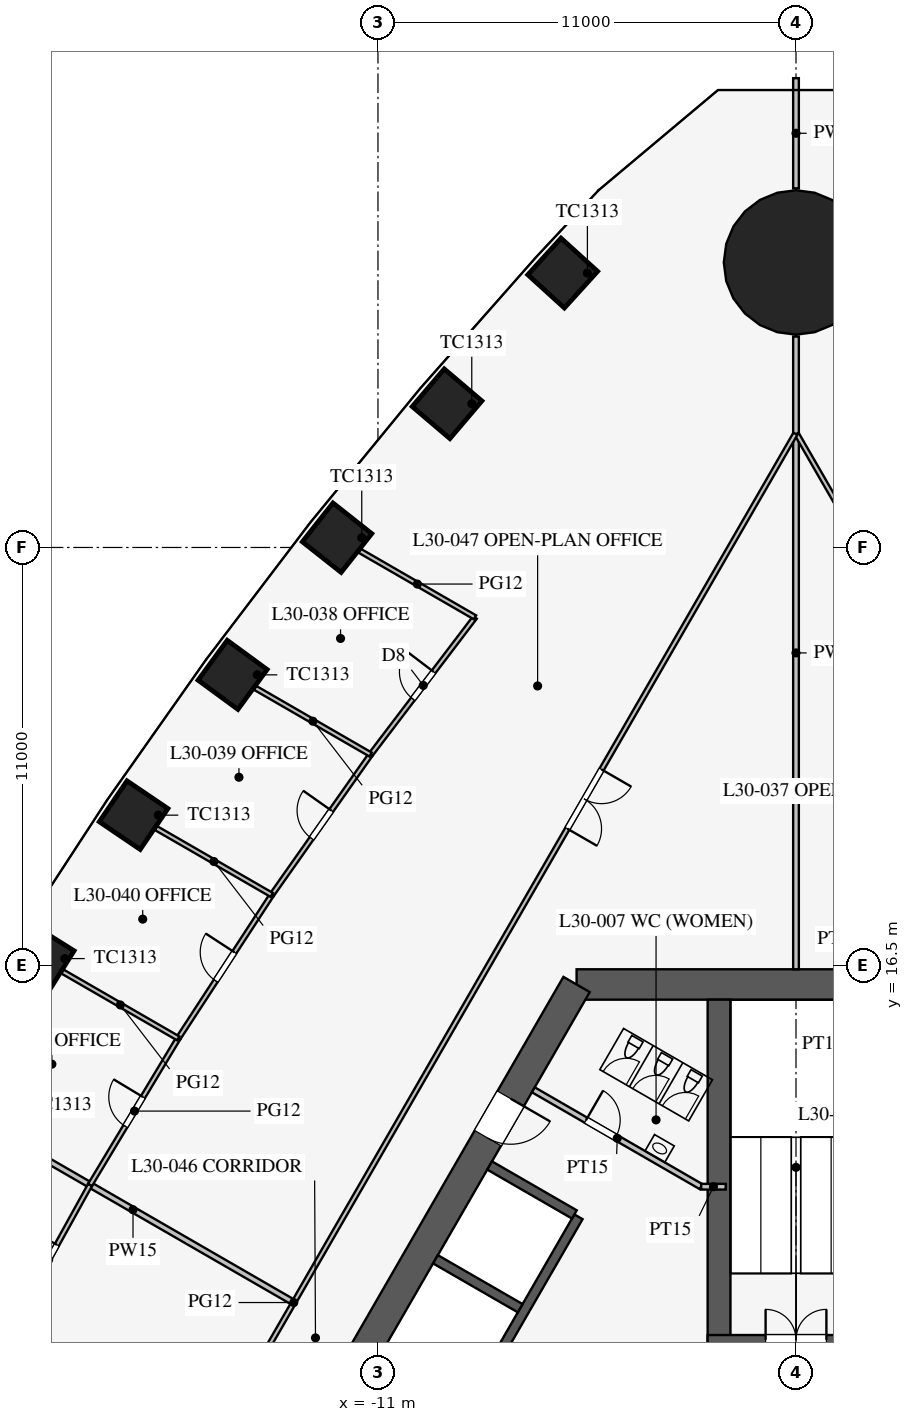
"""IFC4 building model, lengths in metres.
Left out: names, types, materials, properties, quantities, classifications, styles, units other than length and angle.
Written with IfcOpenShell. Run it as: python <this file> out.ifc"""

import sys

from ifc_helpers import new_model, si_unit, direction, frame, frame_2d, origin, origin_2d, place, context, subcontext, project, spatial, rectangle, circle, extrude, element, fill, save


model = new_model("IFC4")
c1 = context("Model", 3, precision=1e-05, world=origin(), true_north=direction((0.0, 1.0)))
c2 = subcontext(c1, "Body", "Model", "MODEL_VIEW")
j1 = project(units=[si_unit("LENGTHUNIT", "METRE"), si_unit("PLANEANGLEUNIT", "RADIAN")], contexts=[c1])
p1 = place(None, origin())
s1 = spatial("IfcSite", under=j1, at=p1, CompositionType="ELEMENT")
p2 = place(p1, origin())
s2 = spatial("IfcBuilding", under=s1, at=p2, CompositionType="ELEMENT")
p3 = place(p2, frame((0.0, 0.0, 132.5)))
s3 = spatial("IfcBuildingStorey", under=s2, at=p3, CompositionType="ELEMENT", Elevation=132.5)
for number, where, z_axis, x_axis in (
    (1, (-6.139, 34.721, 0.0), (0.0, 0.0, 1.0), (-0.672, -0.74, 0.0)),
    (2, (-9.182, 31.282, 0.0), (0.0, 0.0, 1.0), (-0.648, -0.762, 0.0)),
    (3, (-12.077, 27.757, 0.0), (0.0, 0.0, 1.0), (-0.62, -0.785, 0.0)),
    (4, (-14.825, 24.148, 0.0), (0.0, 0.0, 1.0), (-0.591, -0.807, 0.0)),
    (5, (-17.43, 20.456, 0.0), (0.0, 0.0, 1.0), (-0.561, -0.828, 0.0)),
    (6, (-19.893, 16.681, 0.0), (0.0, 0.0, 1.0), (-0.531, -0.847, 0.0)),
):
    element("IfcColumn", number, at=place(p3, frame(where, z_axis=z_axis, x_axis=x_axis)), inside=s3, PredefinedType="COLUMN", context=c2, shape_type="SweptSolid", body=[
        extrude(rectangle(XDim=1.3, YDim=1.3, at=origin_2d()), origin(), (0.0, 0.0, 1.0), 4.2),
    ])
p4 = place(p3, frame((0.0, 35.0, 0.0), z_axis=(0.0, 0.0, 1.0), x_axis=(1.0, 0.0, 0.0)))
e7 = element("IfcColumn", 7, at=p4, inside=s3, PredefinedType="COLUMN", context=c2, shape_type="SweptSolid", body=[
    extrude(circle(Radius=1.9, at=origin_2d()), origin(), (0.0, 0.0, 1.0), 4.2),
])
p5 = place(p3, frame((5.773, 16.0, 0.0), z_axis=(0.0, 0.0, 1.0), x_axis=(-1.0, 0.0, 0.0)))
e8 = element("IfcWall", 8, at=p5, inside=s3, PredefinedType="SHEAR", context=c2, shape_type="SweptSolid", body=[
    extrude(rectangle(XDim=11.547, YDim=0.8, at=frame_2d((5.773, 0.0))), origin(), (0.0, 0.0, 1.0), 4.2),
])
p6 = place(p3, frame((-5.773, 16.0, 0.0), z_axis=(0.0, 0.0, 1.0), x_axis=(-0.500002442456, -0.866023993627, 0.0)))
e9 = element("IfcWall", 9, at=p6, inside=s3, PredefinedType="SHEAR", context=c2, shape_type="SweptSolid", body=[
    extrude(rectangle(XDim=21.939, YDim=0.8, at=frame_2d((10.97, 0.0))), origin(), (0.0, 0.0, 1.0), 4.2),
])
p7 = place(p6, frame((17.27, 0.0, 0.0)))
e10 = element("IfcOpeningElement", 10, at=p7, cuts=e9, PredefinedType="OPENING", context=c2, shape_type="SweptSolid", body=[
    extrude(rectangle(XDim=1.2, YDim=2.1, at=frame_2d((0.6, 1.05))), frame((0.0, 0.41, 0.0), z_axis=(0.0, -1.0, 0.0), x_axis=(1.0, 0.0, 0.0)), (0.0, 0.0, 1.0), 0.82),
])
p8 = place(p6, frame((3.47, 0.0, 0.0)))
e11 = element("IfcOpeningElement", 11, at=p8, cuts=e9, PredefinedType="OPENING", context=c2, shape_type="SweptSolid", body=[
    extrude(rectangle(XDim=1.2, YDim=2.1, at=frame_2d((0.6, 1.05))), frame((0.0, 0.41, 0.0), z_axis=(0.0, -1.0, 0.0), x_axis=(1.0, 0.0, 0.0)), (0.0, 0.0, 1.0), 0.82),
])
p9 = place(p3, frame((-5.724, 9.886, 0.0), z_axis=(0.0, 0.0, 1.0), x_axis=(-0.500001763848, -0.866024385424, 0.0)))
e12 = element("IfcWall", 12, at=p9, inside=s3, PredefinedType="SHEAR", context=c2, shape_type="SweptSolid", body=[
    extrude(rectangle(XDim=11.4, YDim=0.25, at=frame_2d((5.7, 0.0))), origin(), (0.0, 0.0, 1.0), 4.2),
])
p10 = place(p9, frame((6.525, 0.0, 0.0)))
e13 = element("IfcOpeningElement", 13, at=p10, cuts=e12, PredefinedType="OPENING", context=c2, shape_type="SweptSolid", body=[
    extrude(rectangle(XDim=1.2, YDim=2.2, at=frame_2d((0.6, 1.1))), frame((0.0, 0.135, 0.0), z_axis=(0.0, -1.0, 0.0), x_axis=(1.0, 0.0, 0.0)), (0.0, 0.0, 1.0), 0.27),
])
p11 = place(p9, frame((9.375, 0.0, 0.0)))
e14 = element("IfcOpeningElement", 14, at=p11, cuts=e12, PredefinedType="OPENING", context=c2, shape_type="SweptSolid", body=[
    extrude(rectangle(XDim=1.2, YDim=2.2, at=frame_2d((0.6, 1.1))), frame((0.0, 0.135, 0.0), z_axis=(0.0, -1.0, 0.0), x_axis=(1.0, 0.0, 0.0)), (0.0, 0.0, 1.0), 0.27),
])
p12 = place(p3, frame((-5.832, 9.949, 0.0), z_axis=(0.0, 0.0, 1.0), x_axis=(-0.866029291668, 0.499993265928, 0.0)))
e15 = element("IfcWall", 15, at=p12, inside=s3, PredefinedType="SHEAR", context=c2, shape_type="SweptSolid", body=[
    extrude(rectangle(XDim=2.575, YDim=0.25, at=frame_2d((1.288, 0.0))), origin(), (0.0, 0.0, 1.0), 4.2),
])
p13 = place(p3, frame((-7.257, 7.481, 0.0), z_axis=(0.0, 0.0, 1.0), x_axis=(-0.866046643894, 0.499963209246, 0.0)))
e16 = element("IfcWall", 16, at=p13, inside=s3, PredefinedType="SHEAR", context=c2, shape_type="SweptSolid", body=[
    extrude(rectangle(XDim=2.575, YDim=0.25, at=frame_2d((1.288, 0.0))), origin(), (0.0, 0.0, 1.0), 4.2),
])
p14 = place(p3, frame((-2.025, 6.525, 0.0), z_axis=(0.0, 0.0, 1.0), x_axis=(0.0, 1.0, 0.0)))
e17 = element("IfcWall", 17, at=p14, inside=s3, PredefinedType="SHEAR", context=c2, shape_type="SweptSolid", body=[
    extrude(rectangle(XDim=9.075, YDim=0.6, at=frame_2d((4.538, 0.0))), origin(), (0.0, 0.0, 1.0), 4.2),
])
p15 = place(p3, frame((2.325, 6.65, 0.0), z_axis=(0.0, 0.0, 1.0), x_axis=(-1.0, 0.0, 0.0)))
e18 = element("IfcWall", 18, at=p15, inside=s3, PredefinedType="SHEAR", context=c2, shape_type="SweptSolid", body=[
    extrude(rectangle(XDim=4.65, YDim=0.25, at=frame_2d((2.325, 0.0))), origin(), (0.0, 0.0, 1.0), 4.2),
])
p16 = place(p15, frame((1.525, 0.0, 0.0)))
e19 = element("IfcOpeningElement", 19, at=p16, cuts=e18, PredefinedType="OPENING", context=c2, shape_type="SweptSolid", body=[
    extrude(rectangle(XDim=1.6, YDim=2.1, at=frame_2d((0.8, 1.05))), frame((0.0, 0.135, 0.0), z_axis=(0.0, -1.0, 0.0), x_axis=(1.0, 0.0, 0.0)), (0.0, 0.0, 1.0), 0.27),
])
p17 = place(p3, frame((-2.495, 10.678, 0.0), z_axis=(0.0, 0.0, 1.0), x_axis=(-0.86602216432, 0.500005610874, 0.0)))
e20 = element("IfcWall", 20, at=p17, inside=s3, PredefinedType="PARTITIONING", context=c2, shape_type="SweptSolid", body=[
    extrude(rectangle(XDim=5.1, YDim=0.15, at=frame_2d((2.55, 0.0))), origin(), (0.0, 0.0, 1.0), 4.0),
])
p18 = place(p17, frame((2.6, 0.0, 0.0)))
e21 = element("IfcOpeningElement", 21, at=p18, cuts=e20, PredefinedType="OPENING", context=c2, shape_type="SweptSolid", body=[
    extrude(rectangle(XDim=0.9, YDim=2.1, at=frame_2d((0.45, 1.05))), frame((0.0, 0.085, 0.0), z_axis=(0.0, -1.0, 0.0), x_axis=(1.0, 0.0, 0.0)), (0.0, 0.0, 1.0), 0.17),
])
p19 = place(p3, frame((-2.495, 10.678, 0.0), z_axis=(0.0, 0.0, 1.0), x_axis=(1.0, 0.0, 0.0)))
e22 = element("IfcWall", 22, at=p19, inside=s3, PredefinedType="PARTITIONING", context=c2, shape_type="SweptSolid", body=[
    extrude(rectangle(XDim=0.645, YDim=0.15, at=frame_2d((0.323, 0.0))), origin(), (0.0, 0.0, 1.0), 4.0),
])
p20 = place(p3, frame((0.0, 16.4, 0.0), z_axis=(0.0, 0.0, 1.0), x_axis=(0.0, 1.0, 0.0)))
e23 = element("IfcWall", 23, at=p20, inside=s3, PredefinedType="PARTITIONING", context=c2, shape_type="SweptSolid", body=[
    extrude(rectangle(XDim=16.65, YDim=0.15, at=frame_2d((8.325, 0.0))), origin(), (0.0, 0.0, 1.0), 2.3),
])
p21 = place(p3, frame((0.0, 36.95, 0.0), z_axis=(0.0, 0.0, 1.0), x_axis=(0.0, 1.0, 0.0)))
e24 = element("IfcWall", 24, at=p21, inside=s3, PredefinedType="PARTITIONING", context=c2, shape_type="SweptSolid", body=[
    extrude(rectangle(XDim=2.899, YDim=0.15, at=frame_2d((1.45, 0.0))), origin(), (0.0, 0.0, 1.0), 2.3),
])
p22 = place(p3, frame((26.415, -15.231, 0.0), z_axis=(0.0, 0.0, 1.0), x_axis=(-0.50000091641, 0.866024874695, 0.0)))
e25 = element("IfcWall", 25, at=p22, inside=s3, PredefinedType="PARTITIONING", context=c2, shape_type="SweptSolid", body=[
    extrude(rectangle(XDim=52.796, YDim=0.12, at=frame_2d((26.398, 0.0))), origin(), (0.0, 0.0, 1.0), 2.9),
])
p23 = place(p22, frame((10.2, 0.0, 0.15)))
e26 = element("IfcOpeningElement", 26, at=p23, cuts=e25, PredefinedType="OPENING", context=c2, shape_type="SweptSolid", body=[
    extrude(rectangle(XDim=1.8, YDim=2.1, at=frame_2d((0.9, 1.05))), frame((0.0, 0.07, 0.0), z_axis=(0.0, -1.0, 0.0), x_axis=(1.0, 0.0, 0.0)), (0.0, 0.0, 1.0), 0.14),
])
p24 = place(p22, frame((40.8, 0.0, 0.15)))
e27 = element("IfcOpeningElement", 27, at=p24, cuts=e25, PredefinedType="OPENING", context=c2, shape_type="SweptSolid", body=[
    extrude(rectangle(XDim=1.8, YDim=2.1, at=frame_2d((0.9, 1.05))), frame((0.0, 0.07, 0.0), z_axis=(0.0, -1.0, 0.0), x_axis=(1.0, 0.0, 0.0)), (0.0, 0.0, 1.0), 0.14),
])
p25 = place(p3, frame((-13.268, 7.66, 0.0), z_axis=(0.0, 0.0, 1.0), x_axis=(-0.866015788683, 0.500016653474, 0.0)))
e28 = element("IfcWall", 28, at=p25, inside=s3, PredefinedType="PARTITIONING", context=c2, shape_type="SweptSolid", body=[
    extrude(rectangle(XDim=9.65, YDim=0.15, at=frame_2d((4.825, 0.0))), origin(), (0.0, 0.0, 1.0), 3.2),
])
p26 = place(p3, frame((-0.016, 30.491, 0.0), z_axis=(0.0, 0.0, 1.0), x_axis=(-0.50000091641, -0.866024874695, 0.0)))
e29 = element("IfcWall", 29, at=p26, inside=s3, PredefinedType="PARTITIONING", context=c2, shape_type="SweptSolid", body=[
    extrude(rectangle(XDim=52.796, YDim=0.12, at=frame_2d((26.398, 0.0))), origin(), (0.0, 0.0, 1.0), 2.9),
])
p27 = place(p26, frame((10.2, 0.0, 0.15)))
e30 = element("IfcOpeningElement", 30, at=p27, cuts=e29, PredefinedType="OPENING", context=c2, shape_type="SweptSolid", body=[
    extrude(rectangle(XDim=1.8, YDim=2.1, at=frame_2d((0.9, 1.05))), frame((0.0, 0.07, 0.0), z_axis=(0.0, -1.0, 0.0), x_axis=(1.0, 0.0, 0.0)), (0.0, 0.0, 1.0), 0.14),
])
p28 = place(p26, frame((40.8, 0.0, 0.15)))
e31 = element("IfcOpeningElement", 31, at=p28, cuts=e29, PredefinedType="OPENING", context=c2, shape_type="SweptSolid", body=[
    extrude(rectangle(XDim=1.8, YDim=2.1, at=frame_2d((0.9, 1.05))), frame((0.0, 0.07, 0.0), z_axis=(0.0, -1.0, 0.0), x_axis=(1.0, 0.0, 0.0)), (0.0, 0.0, 1.0), 0.14),
])
p29 = place(p3, frame((-18.576, 10.725, 0.0), z_axis=(0.0, 0.0, 1.0), x_axis=(-0.484292898211, -0.874905931368, 0.0)))
e32 = element("IfcWall", 32, at=p29, inside=s3, PredefinedType="PARTITIONING", context=c2, shape_type="SweptSolid", body=[
    extrude(rectangle(XDim=4.501, YDim=0.12, at=frame_2d((2.25, 0.0))), origin(), (0.0, 0.0, 1.0), 2.9),
])
p30 = place(p29, frame((1.8, 0.0, 0.15)))
e33 = element("IfcOpeningElement", 33, at=p30, cuts=e32, PredefinedType="OPENING", context=c2, shape_type="SweptSolid", body=[
    extrude(rectangle(XDim=0.9, YDim=2.1, at=frame_2d((0.45, 1.05))), frame((0.0, 0.07, 0.0), z_axis=(0.0, -1.0, 0.0), x_axis=(1.0, 0.0, 0.0)), (0.0, 0.0, 1.0), 0.14),
])
p31 = place(p3, frame((-11.192, 22.05, 0.0), z_axis=(0.0, 0.0, 1.0), x_axis=(-0.575987178736, -0.817458726745, 0.0)))
e34 = element("IfcWall", 34, at=p31, inside=s3, PredefinedType="PARTITIONING", context=c2, shape_type="SweptSolid", body=[
    extrude(rectangle(XDim=4.518, YDim=0.12, at=frame_2d((2.259, 0.0))), origin(), (0.0, 0.0, 1.0), 2.9),
])
p32 = place(p31, frame((1.8, 0.0, 0.15)))
e35 = element("IfcOpeningElement", 35, at=p32, cuts=e34, PredefinedType="OPENING", context=c2, shape_type="SweptSolid", body=[
    extrude(rectangle(XDim=0.9, YDim=2.1, at=frame_2d((0.45, 1.05))), frame((0.0, 0.07, 0.0), z_axis=(0.0, -1.0, 0.0), x_axis=(1.0, 0.0, 0.0)), (0.0, 0.0, 1.0), 0.14),
])
p33 = place(p3, frame((-8.447, 25.661, 0.0), z_axis=(0.0, 0.0, 1.0), x_axis=(-0.605274299339, -0.796016973789, 0.0)))
e36 = element("IfcWall", 36, at=p33, inside=s3, PredefinedType="PARTITIONING", context=c2, shape_type="SweptSolid", body=[
    extrude(rectangle(XDim=4.536, YDim=0.12, at=frame_2d((2.268, 0.0))), origin(), (0.0, 0.0, 1.0), 2.9),
])
p34 = place(p33, frame((1.8, 0.0, 0.15)))
e37 = element("IfcOpeningElement", 37, at=p34, cuts=e36, PredefinedType="OPENING", context=c2, shape_type="SweptSolid", body=[
    extrude(rectangle(XDim=0.9, YDim=2.1, at=frame_2d((0.45, 1.05))), frame((0.0, 0.07, 0.0), z_axis=(0.0, -1.0, 0.0), x_axis=(1.0, 0.0, 0.0)), (0.0, 0.0, 1.0), 0.14),
])
p35 = place(p3, frame((-16.256, 14.581, 0.0), z_axis=(0.0, 0.0, 1.0), x_axis=(-0.515548366618, -0.856860479703, 0.0)))
e38 = element("IfcWall", 38, at=p35, inside=s3, PredefinedType="PARTITIONING", context=c2, shape_type="SweptSolid", body=[
    extrude(rectangle(XDim=4.501, YDim=0.12, at=frame_2d((2.25, 0.0))), origin(), (0.0, 0.0, 1.0), 2.9),
])
p36 = place(p35, frame((1.8, 0.0, 0.15)))
e39 = element("IfcOpeningElement", 39, at=p36, cuts=e38, PredefinedType="OPENING", context=c2, shape_type="SweptSolid", body=[
    extrude(rectangle(XDim=0.9, YDim=2.1, at=frame_2d((0.45, 1.05))), frame((0.0, 0.07, 0.0), z_axis=(0.0, -1.0, 0.0), x_axis=(1.0, 0.0, 0.0)), (0.0, 0.0, 1.0), 0.14),
])
p37 = place(p3, frame((-13.795, 18.357, 0.0), z_axis=(0.0, 0.0, 1.0), x_axis=(-0.546069464151, -0.837739900161, 0.0)))
e40 = element("IfcWall", 40, at=p37, inside=s3, PredefinedType="PARTITIONING", context=c2, shape_type="SweptSolid", body=[
    extrude(rectangle(XDim=4.507, YDim=0.12, at=frame_2d((2.253, 0.0))), origin(), (0.0, 0.0, 1.0), 2.9),
])
p38 = place(p37, frame((1.8, 0.0, 0.15)))
e41 = element("IfcOpeningElement", 41, at=p38, cuts=e40, PredefinedType="OPENING", context=c2, shape_type="SweptSolid", body=[
    extrude(rectangle(XDim=0.9, YDim=2.1, at=frame_2d((0.45, 1.05))), frame((0.0, 0.07, 0.0), z_axis=(0.0, -1.0, 0.0), x_axis=(1.0, 0.0, 0.0)), (0.0, 0.0, 1.0), 0.14),
])
p39 = place(p3, frame((-11.192, 22.05, 0.0), z_axis=(0.0, 0.0, 1.0), x_axis=(-0.866039702589, 0.499975232926, 0.0)))
e42 = element("IfcWall", 42, at=p39, inside=s3, PredefinedType="PARTITIONING", context=c2, shape_type="SweptSolid", body=[
    extrude(rectangle(XDim=3.511, YDim=0.12, at=frame_2d((1.756, 0.0))), origin(), (0.0, 0.0, 1.0), 2.9),
])
p40 = place(p3, frame((-8.447, 25.661, 0.0), z_axis=(0.0, 0.0, 1.0), x_axis=(-0.865996479531, 0.50005009493, 0.0)))
e43 = element("IfcWall", 43, at=p40, inside=s3, PredefinedType="PARTITIONING", context=c2, shape_type="SweptSolid", body=[
    extrude(rectangle(XDim=3.505, YDim=0.12, at=frame_2d((1.752, 0.0))), origin(), (0.0, 0.0, 1.0), 2.9),
])
p41 = place(p3, frame((-16.256, 14.581, 0.0), z_axis=(0.0, 0.0, 1.0), x_axis=(-0.866027308682, 0.499996700606, 0.0)))
e44 = element("IfcWall", 44, at=p41, inside=s3, PredefinedType="PARTITIONING", context=c2, shape_type="SweptSolid", body=[
    extrude(rectangle(XDim=3.519, YDim=0.12, at=frame_2d((1.76, 0.0))), origin(), (0.0, 0.0, 1.0), 2.9),
])
p42 = place(p3, frame((-13.795, 18.357, 0.0), z_axis=(0.0, 0.0, 1.0), x_axis=(-0.866034119795, 0.499984903122, 0.0)))
e45 = element("IfcWall", 45, at=p42, inside=s3, PredefinedType="PARTITIONING", context=c2, shape_type="SweptSolid", body=[
    extrude(rectangle(XDim=3.516, YDim=0.12, at=frame_2d((1.758, 0.0))), origin(), (0.0, 0.0, 1.0), 2.9),
])
p43 = place(p18, frame((0.9, 0.0, 0.0), z_axis=(0.0, 0.0, 1.0), x_axis=(-1.0, 0.0, 0.0)))
e46 = element("IfcDoor", 46, at=p43, inside=s3, OperationType="SINGLE_SWING_LEFT", PredefinedType="DOOR", context=c2, shape_type="SweptSolid", body=[
    extrude(rectangle(XDim=0.9, YDim=2.1, at=frame_2d((0.45, 1.05))), frame((0.0, 0.025, 0.0), z_axis=(0.0, -1.0, 0.0), x_axis=(1.0, 0.0, 0.0)), (0.0, 0.0, 1.0), 0.05),
])
fill(e21, e46)
p44 = place(p16, frame((1.6, 0.0, 0.0), z_axis=(0.0, 0.0, 1.0), x_axis=(-1.0, 0.0, 0.0)))
e47 = element("IfcDoor", 47, at=p44, inside=s3, OperationType="DOUBLE_DOOR_SINGLE_SWING", PredefinedType="DOOR", context=c2, shape_type="SweptSolid", body=[
    extrude(rectangle(XDim=1.6, YDim=2.1, at=frame_2d((0.8, 1.05))), frame((0.0, 0.025, 0.0), z_axis=(0.0, -1.0, 0.0), x_axis=(1.0, 0.0, 0.0)), (0.0, 0.0, 1.0), 0.05),
])
fill(e19, e47)
p45 = place(p8, origin())
e48 = element("IfcDoor", 48, at=p45, inside=s3, OperationType="SINGLE_SWING_LEFT", PredefinedType="DOOR", context=c2, shape_type="SweptSolid", body=[
    extrude(rectangle(XDim=1.2, YDim=2.1, at=frame_2d((0.6, 1.05))), frame((0.0, 0.025, 0.0), z_axis=(0.0, -1.0, 0.0), x_axis=(1.0, 0.0, 0.0)), (0.0, 0.0, 1.0), 0.05),
])
fill(e11, e48)
p46 = place(p34, frame((0.9, 0.0, 0.0), z_axis=(0.0, 0.0, 1.0), x_axis=(-1.0, 0.0, 0.0)))
e49 = element("IfcDoor", 49, at=p46, inside=s3, OperationType="SINGLE_SWING_RIGHT", PredefinedType="DOOR", context=c2, shape_type="SweptSolid", body=[
    extrude(rectangle(XDim=0.9, YDim=2.1, at=frame_2d((0.45, 1.05))), frame((0.0, 0.025, 0.0), z_axis=(0.0, -1.0, 0.0), x_axis=(1.0, 0.0, 0.0)), (0.0, 0.0, 1.0), 0.05),
])
fill(e37, e49)
p47 = place(p32, frame((0.9, 0.0, 0.0), z_axis=(0.0, 0.0, 1.0), x_axis=(-1.0, 0.0, 0.0)))
e50 = element("IfcDoor", 50, at=p47, inside=s3, OperationType="SINGLE_SWING_RIGHT", PredefinedType="DOOR", context=c2, shape_type="SweptSolid", body=[
    extrude(rectangle(XDim=0.9, YDim=2.1, at=frame_2d((0.45, 1.05))), frame((0.0, 0.025, 0.0), z_axis=(0.0, -1.0, 0.0), x_axis=(1.0, 0.0, 0.0)), (0.0, 0.0, 1.0), 0.05),
])
fill(e35, e50)
p48 = place(p38, frame((0.9, 0.0, 0.0), z_axis=(0.0, 0.0, 1.0), x_axis=(-1.0, 0.0, 0.0)))
e51 = element("IfcDoor", 51, at=p48, inside=s3, OperationType="SINGLE_SWING_RIGHT", PredefinedType="DOOR", context=c2, shape_type="SweptSolid", body=[
    extrude(rectangle(XDim=0.9, YDim=2.1, at=frame_2d((0.45, 1.05))), frame((0.0, 0.025, 0.0), z_axis=(0.0, -1.0, 0.0), x_axis=(1.0, 0.0, 0.0)), (0.0, 0.0, 1.0), 0.05),
])
fill(e41, e51)
p49 = place(p36, frame((0.9, 0.0, 0.0), z_axis=(0.0, 0.0, 1.0), x_axis=(-1.0, 0.0, 0.0)))
e52 = element("IfcDoor", 52, at=p49, inside=s3, OperationType="SINGLE_SWING_RIGHT", PredefinedType="DOOR", context=c2, shape_type="SweptSolid", body=[
    extrude(rectangle(XDim=0.9, YDim=2.1, at=frame_2d((0.45, 1.05))), frame((0.0, 0.025, 0.0), z_axis=(0.0, -1.0, 0.0), x_axis=(1.0, 0.0, 0.0)), (0.0, 0.0, 1.0), 0.05),
])
fill(e39, e52)
p50 = place(p30, frame((0.9, 0.0, 0.0), z_axis=(0.0, 0.0, 1.0), x_axis=(-1.0, 0.0, 0.0)))
e53 = element("IfcDoor", 53, at=p50, inside=s3, OperationType="SINGLE_SWING_RIGHT", PredefinedType="DOOR", context=c2, shape_type="SweptSolid", body=[
    extrude(rectangle(XDim=0.9, YDim=2.1, at=frame_2d((0.45, 1.05))), frame((0.0, 0.025, 0.0), z_axis=(0.0, -1.0, 0.0), x_axis=(1.0, 0.0, 0.0)), (0.0, 0.0, 1.0), 0.05),
])
fill(e33, e53)
p51 = place(p27, origin())
e54 = element("IfcDoor", 54, at=p51, inside=s3, OperationType="DOUBLE_DOOR_SINGLE_SWING", PredefinedType="DOOR", context=c2, shape_type="SweptSolid", body=[
    extrude(rectangle(XDim=1.8, YDim=2.1, at=frame_2d((0.9, 1.05))), frame((0.0, 0.025, 0.0), z_axis=(0.0, -1.0, 0.0), x_axis=(1.0, 0.0, 0.0)), (0.0, 0.0, 1.0), 0.05),
])
fill(e30, e54)
save(model, sys.argv[1])
